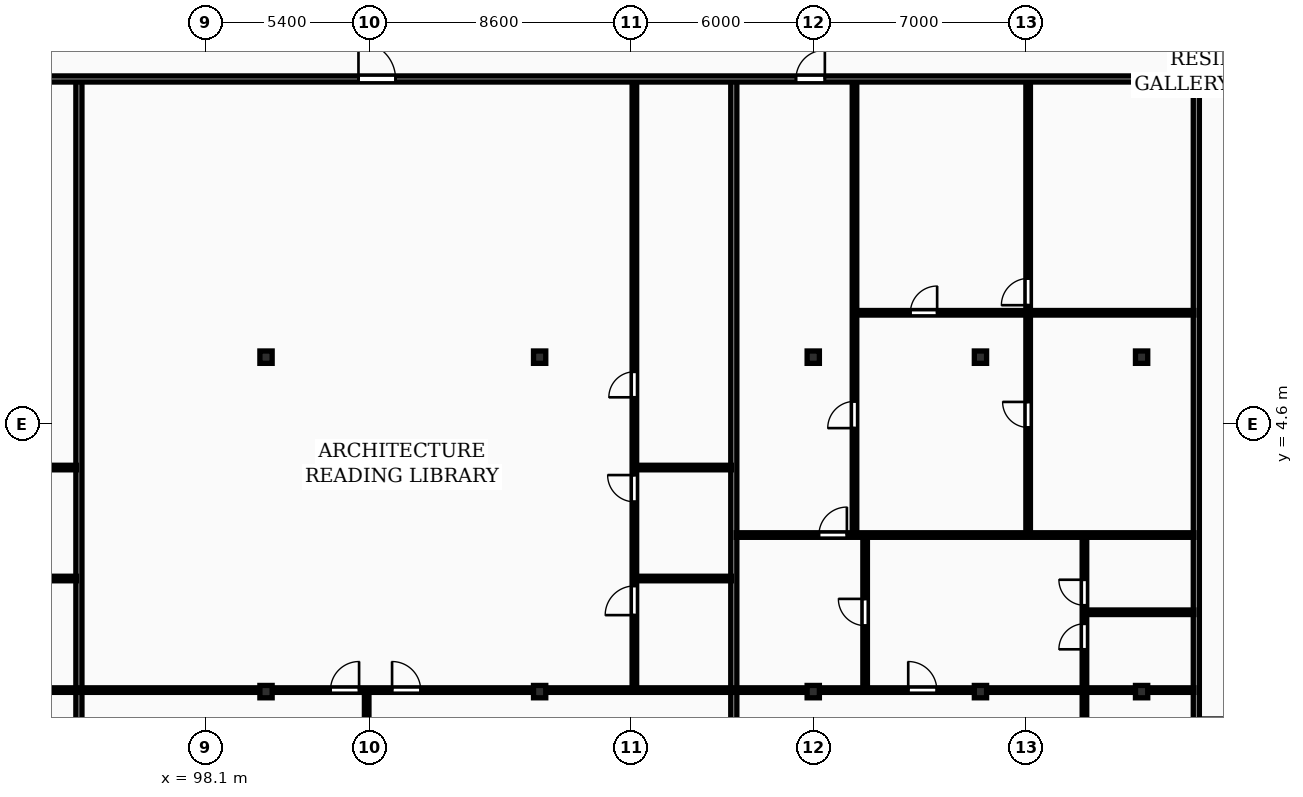
"""IFC4 building model, lengths in metres.
Left out: names, types, materials, properties, quantities, classifications, styles, units other than length and angle.
Written with IfcOpenShell. Run it as: python <this file> out.ifc"""

import sys

from ifc_helpers import new_model, si_unit, direction, frame, frame_2d, origin, origin_2d, place, context, subcontext, project, spatial, rectangle, i_section, extrude, element, fill, save


model = new_model("IFC4")
c1 = context("Model", 3, precision=1e-05, world=origin(), true_north=direction((0.0, 1.0)))
c2 = subcontext(c1, "Body", "Model", "MODEL_VIEW")
j1 = project(units=[si_unit("LENGTHUNIT", "METRE"), si_unit("PLANEANGLEUNIT", "RADIAN")], contexts=[c1])
p1 = place(None, origin())
s1 = spatial("IfcSite", under=j1, at=p1, CompositionType="ELEMENT")
p2 = place(p1, origin())
s2 = spatial("IfcBuilding", under=s1, at=p2, CompositionType="ELEMENT")
p3 = place(p2, frame((0.0, 0.0, 150.1)))
s3 = spatial("IfcBuildingStorey", under=s2, at=p3, CompositionType="ELEMENT", Elevation=150.1)
for number, where, z_axis, x_axis in (
    (1, (100.1, -4.2, 0.0), (0.0, 0.0, 1.0), (1.0, 0.0, 0.0)),
    (2, (100.1, 6.8, 0.0), (0.0, 0.0, 1.0), (1.0, 0.0, 0.0)),
    (3, (109.1, -4.2, 0.0), (0.0, 0.0, 1.0), (1.0, 0.0, 0.0)),
    (4, (109.1, 6.8, 0.0), (0.0, 0.0, 1.0), (1.0, 0.0, 0.0)),
    (5, (118.1, -4.2, 0.0), (0.0, 0.0, 1.0), (1.0, 0.0, 0.0)),
    (6, (118.1, 6.8, 0.0), (0.0, 0.0, 1.0), (1.0, 0.0, 0.0)),
    (7, (123.6, -4.2, 0.0), (0.0, 0.0, 1.0), (1.0, 0.0, 0.0)),
    (8, (123.6, 6.8, 0.0), (0.0, 0.0, 1.0), (1.0, 0.0, 0.0)),
    (9, (128.9, -4.2, 0.0), (0.0, 0.0, 1.0), (1.0, 0.0, 0.0)),
    (10, (128.9, 6.8, 0.0), (0.0, 0.0, 1.0), (1.0, 0.0, 0.0)),
):
    element("IfcColumn", number, at=place(p3, frame(where, z_axis=z_axis, x_axis=x_axis)), inside=s3, PredefinedType="COLUMN", context=c2, shape_type="SweptSolid", body=[
        extrude(i_section(OverallWidth=0.403, OverallDepth=0.406, WebThickness=0.027, FlangeThickness=0.043, FilletRadius=0.015, at=origin_2d()), origin(), (0.0, 0.0, 1.0), 3.6),
    ])
for number, where, z_axis, x_axis in (
    (11, (130.7, -8.7, 0.0), (0.0, 0.0, 1.0), (0.0, 1.0, 0.0)),
    (12, (93.946, -8.7, 0.0), (0.0, 0.0, 1.0), (0.0, 1.0, 0.0)),
):
    element("IfcWall", number, at=place(p3, frame(where, z_axis=z_axis, x_axis=x_axis)), inside=s3, PredefinedType="PARTITIONING", context=c2, shape_type="SweptSolid", body=[
        extrude(rectangle(XDim=24.57, YDim=0.2, at=frame_2d((12.285, 0.0))), origin(), (0.0, 0.0, 1.0), 3.31),
    ])
for number, where, z_axis, x_axis in (
    (13, (90.506, -0.48, 0.0), (0.0, 0.0, 1.0), (1.0, 0.0, 0.0)),
    (14, (90.506, 3.17, 0.0), (0.0, 0.0, 1.0), (1.0, 0.0, 0.0)),
):
    element("IfcWall", number, at=place(p3, frame(where, z_axis=z_axis, x_axis=x_axis)), inside=s3, PredefinedType="PARTITIONING", context=c2, shape_type="SweptSolid", body=[
        extrude(rectangle(XDim=3.36, YDim=0.15, at=frame_2d((1.68, 0.0))), origin(), (0.0, 0.0, 1.0), 3.31),
    ])
p4 = place(p3, frame((72.78, -4.15, 0.0), z_axis=(0.0, 0.0, 1.0), x_axis=(1.0, 0.0, 0.0)))
e15 = element("IfcWall", 15, at=p4, inside=s3, PredefinedType="PARTITIONING", context=c2, shape_type="SweptSolid", body=[
    extrude(rectangle(XDim=21.085, YDim=0.15, at=frame_2d((10.543, 0.0))), origin(), (0.0, 0.0, 1.0), 3.003),
])
p5 = place(p4, frame((6.874, 0.0, 0.0)))
e16 = element("IfcOpeningElement", 16, at=p5, cuts=e15, PredefinedType="OPENING", context=c2, shape_type="SweptSolid", body=[
    extrude(rectangle(XDim=0.92, YDim=2.08, at=frame_2d((0.46, 1.04))), frame((0.0, 0.085, 0.0), z_axis=(0.0, -1.0, 0.0), x_axis=(1.0, 0.0, 0.0)), (0.0, 0.0, 1.0), 0.17),
])
p6 = place(p4, frame((10.797, 0.0, 0.0)))
e17 = element("IfcOpeningElement", 17, at=p6, cuts=e15, PredefinedType="OPENING", context=c2, shape_type="SweptSolid", body=[
    extrude(rectangle(XDim=0.92, YDim=2.08, at=frame_2d((0.46, 1.04))), frame((0.0, 0.085, 0.0), z_axis=(0.0, -1.0, 0.0), x_axis=(1.0, 0.0, 0.0)), (0.0, 0.0, 1.0), 0.17),
])
p7 = place(p3, frame((115.486, -8.7, 0.0), z_axis=(0.0, 0.0, 1.0), x_axis=(0.0, 1.0, 0.0)))
e18 = element("IfcWall", 18, at=p7, inside=s3, PredefinedType="PARTITIONING", context=c2, shape_type="SweptSolid", body=[
    extrude(rectangle(XDim=24.57, YDim=0.2, at=frame_2d((12.285, 0.0))), origin(), (0.0, 0.0, 1.0), 3.31),
])
for number, where, z_axis, x_axis in (
    (19, (112.276, -0.48, 0.0), (0.0, 0.0, 1.0), (1.0, 0.0, 0.0)),
    (20, (112.276, 3.17, 0.0), (0.0, 0.0, 1.0), (1.0, 0.0, 0.0)),
):
    element("IfcWall", number, at=place(p3, frame(where, z_axis=z_axis, x_axis=x_axis)), inside=s3, PredefinedType="PARTITIONING", context=c2, shape_type="SweptSolid", body=[
        extrude(rectangle(XDim=3.13, YDim=0.15, at=frame_2d((1.565, 0.0))), origin(), (0.0, 0.0, 1.0), 3.31),
    ])
p8 = place(p3, frame((112.216, -4.09, 0.0), z_axis=(0.0, 0.0, 1.0), x_axis=(0.0, 1.0, 0.0)))
e21 = element("IfcWall", 21, at=p8, inside=s3, PredefinedType="PARTITIONING", context=c2, shape_type="SweptSolid", body=[
    extrude(rectangle(XDim=19.98, YDim=0.15, at=frame_2d((9.99, 0.0))), origin(), (0.0, 0.0, 1.0), 3.31),
])
p9 = place(p8, frame((2.406, 0.0, 0.0)))
e22 = element("IfcOpeningElement", 22, at=p9, cuts=e21, PredefinedType="OPENING", context=c2, shape_type="SweptSolid", body=[
    extrude(rectangle(XDim=0.96, YDim=2.1, at=frame_2d((0.48, 1.05))), frame((0.0, 0.085, 0.0), z_axis=(0.0, -1.0, 0.0), x_axis=(1.0, 0.0, 0.0)), (0.0, 0.0, 1.0), 0.17),
])
p10 = place(p8, frame((6.133, 0.0, 0.0)))
e23 = element("IfcOpeningElement", 23, at=p10, cuts=e21, PredefinedType="OPENING", context=c2, shape_type="SweptSolid", body=[
    extrude(rectangle(XDim=0.88, YDim=2.06, at=frame_2d((0.44, 1.03))), frame((0.0, 0.085, 0.0), z_axis=(0.0, -1.0, 0.0), x_axis=(1.0, 0.0, 0.0)), (0.0, 0.0, 1.0), 0.17),
])
p11 = place(p8, frame((9.57, 0.0, 0.0)))
e24 = element("IfcOpeningElement", 24, at=p11, cuts=e21, PredefinedType="OPENING", context=c2, shape_type="SweptSolid", body=[
    extrude(rectangle(XDim=0.84, YDim=2.04, at=frame_2d((0.42, 1.02))), frame((0.0, 0.085, 0.0), z_axis=(0.0, -1.0, 0.0), x_axis=(1.0, 0.0, 0.0)), (0.0, 0.0, 1.0), 0.17),
])
p12 = place(p3, frame((103.411, -8.7, 0.0), z_axis=(0.0, 0.0, 1.0), x_axis=(0.0, 1.0, 0.0)))
e25 = element("IfcWall", 25, at=p12, inside=s3, PredefinedType="PARTITIONING", context=c2, shape_type="SweptSolid", body=[
    extrude(rectangle(XDim=4.47, YDim=0.15, at=frame_2d((2.235, 0.0))), origin(), (0.0, 0.0, 1.0), 3.31),
])
p13 = place(p3, frame((94.025, -4.15, 0.0), z_axis=(0.0, 0.0, 1.0), x_axis=(1.0, 0.0, 0.0)))
e26 = element("IfcWall", 26, at=p13, inside=s3, PredefinedType="PARTITIONING", context=c2, shape_type="SweptSolid", body=[
    extrude(rectangle(XDim=21.381, YDim=0.15, at=frame_2d((10.69, 0.0))), origin(), (0.0, 0.0, 1.0), 3.003),
])
p14 = place(p13, frame((8.195, 0.0, 0.0)))
e27 = element("IfcOpeningElement", 27, at=p14, cuts=e26, PredefinedType="OPENING", context=c2, shape_type="SweptSolid", body=[
    extrude(rectangle(XDim=0.94, YDim=2.1, at=frame_2d((0.47, 1.05))), frame((0.0, 0.085, 0.0), z_axis=(0.0, -1.0, 0.0), x_axis=(1.0, 0.0, 0.0)), (0.0, 0.0, 1.0), 0.17),
])
p15 = place(p13, frame((10.22, 0.0, 0.0)))
e28 = element("IfcOpeningElement", 28, at=p15, cuts=e26, PredefinedType="OPENING", context=c2, shape_type="SweptSolid", body=[
    extrude(rectangle(XDim=0.94, YDim=2.1, at=frame_2d((0.47, 1.05))), frame((0.0, 0.085, 0.0), z_axis=(0.0, -1.0, 0.0), x_axis=(1.0, 0.0, 0.0)), (0.0, 0.0, 1.0), 0.17),
])
p16 = place(p3, frame((125.168, 0.99, 0.0), z_axis=(0.0, 0.0, 1.0), x_axis=(0.0, 1.0, 0.0)))
e29 = element("IfcWall", 29, at=p16, inside=s3, PredefinedType="PARTITIONING", context=c2, shape_type="SweptSolid", body=[
    extrude(rectangle(XDim=14.9, YDim=0.15, at=frame_2d((7.45, 0.0))), origin(), (0.0, 0.0, 1.0), 3.31),
])
p17 = place(p16, frame((3.498, 0.0, 0.0)))
e30 = element("IfcOpeningElement", 30, at=p17, cuts=e29, PredefinedType="OPENING", context=c2, shape_type="SweptSolid", body=[
    extrude(rectangle(XDim=0.84, YDim=2.04, at=frame_2d((0.42, 1.02))), frame((0.0, 0.085, 0.0), z_axis=(0.0, -1.0, 0.0), x_axis=(1.0, 0.0, 0.0)), (0.0, 0.0, 1.0), 0.17),
])
p18 = place(p16, frame((7.52, 0.0, 0.0)))
e31 = element("IfcOpeningElement", 31, at=p18, cuts=e29, PredefinedType="OPENING", context=c2, shape_type="SweptSolid", body=[
    extrude(rectangle(XDim=0.88, YDim=2.06, at=frame_2d((0.44, 1.03))), frame((0.0, 0.085, 0.0), z_axis=(0.0, -1.0, 0.0), x_axis=(1.0, 0.0, 0.0)), (0.0, 0.0, 1.0), 0.17),
])
p19 = place(p3, frame((119.516, 8.26, 0.0), z_axis=(0.0, 0.0, 1.0), x_axis=(1.0, 0.0, 0.0)))
e32 = element("IfcWall", 32, at=p19, inside=s3, PredefinedType="PARTITIONING", context=c2, shape_type="SweptSolid", body=[
    extrude(rectangle(XDim=11.104, YDim=0.15, at=frame_2d((5.552, 0.0))), origin(), (0.0, 0.0, 1.0), 3.31),
])
p20 = place(p19, frame((1.779, 0.0, 0.0)))
e33 = element("IfcOpeningElement", 33, at=p20, cuts=e32, PredefinedType="OPENING", context=c2, shape_type="SweptSolid", body=[
    extrude(rectangle(XDim=0.88, YDim=2.06, at=frame_2d((0.44, 1.03))), frame((0.0, 0.085, 0.0), z_axis=(0.0, -1.0, 0.0), x_axis=(1.0, 0.0, 0.0)), (0.0, 0.0, 1.0), 0.17),
])
p21 = place(p3, frame((119.456, 0.99, 0.0), z_axis=(0.0, 0.0, 1.0), x_axis=(0.0, 1.0, 0.0)))
e34 = element("IfcWall", 34, at=p21, inside=s3, PredefinedType="PARTITIONING", context=c2, shape_type="SweptSolid", body=[
    extrude(rectangle(XDim=14.9, YDim=0.15, at=frame_2d((7.45, 0.0))), origin(), (0.0, 0.0, 1.0), 3.31),
])
p22 = place(p21, frame((3.477, 0.0, 0.0)))
e35 = element("IfcOpeningElement", 35, at=p22, cuts=e34, PredefinedType="OPENING", context=c2, shape_type="SweptSolid", body=[
    extrude(rectangle(XDim=0.88, YDim=2.06, at=frame_2d((0.44, 1.03))), frame((0.0, 0.085, 0.0), z_axis=(0.0, -1.0, 0.0), x_axis=(1.0, 0.0, 0.0)), (0.0, 0.0, 1.0), 0.17),
])
p23 = place(p3, frame((119.806, -4.09, 0.0), z_axis=(0.0, 0.0, 1.0), x_axis=(0.0, 1.0, 0.0)))
e36 = element("IfcWall", 36, at=p23, inside=s3, PredefinedType="PARTITIONING", context=c2, shape_type="SweptSolid", body=[
    extrude(rectangle(XDim=5.0, YDim=0.15, at=frame_2d((2.5, 0.0))), origin(), (0.0, 0.0, 1.0), 3.31),
])
p24 = place(p23, frame((2.06, 0.0, 0.0)))
e37 = element("IfcOpeningElement", 37, at=p24, cuts=e36, PredefinedType="OPENING", context=c2, shape_type="SweptSolid", body=[
    extrude(rectangle(XDim=0.88, YDim=2.06, at=frame_2d((0.44, 1.03))), frame((0.0, 0.085, 0.0), z_axis=(0.0, -1.0, 0.0), x_axis=(1.0, 0.0, 0.0)), (0.0, 0.0, 1.0), 0.17),
])
p25 = place(p3, frame((127.08, -1.59, 0.0), z_axis=(0.0, 0.0, 1.0), x_axis=(1.0, 0.0, 0.0)))
e38 = element("IfcWall", 38, at=p25, inside=s3, PredefinedType="PARTITIONING", context=c2, shape_type="SweptSolid", body=[
    extrude(rectangle(XDim=3.54, YDim=0.15, at=frame_2d((1.77, 0.0))), origin(), (0.0, 0.0, 1.0), 3.31),
])
p26 = place(p3, frame((127.02, -8.7, 0.0), z_axis=(0.0, 0.0, 1.0), x_axis=(0.0, 1.0, 0.0)))
e39 = element("IfcWall", 39, at=p26, inside=s3, PredefinedType="PARTITIONING", context=c2, shape_type="SweptSolid", body=[
    extrude(rectangle(XDim=9.61, YDim=0.15, at=frame_2d((4.805, 0.0))), origin(), (0.0, 0.0, 1.0), 3.31),
])
p27 = place(p26, frame((5.892, 0.0, 0.0)))
e40 = element("IfcOpeningElement", 40, at=p27, cuts=e39, PredefinedType="OPENING", context=c2, shape_type="SweptSolid", body=[
    extrude(rectangle(XDim=0.84, YDim=2.04, at=frame_2d((0.42, 1.02))), frame((0.0, 0.085, 0.0), z_axis=(0.0, -1.0, 0.0), x_axis=(1.0, 0.0, 0.0)), (0.0, 0.0, 1.0), 0.17),
])
p28 = place(p26, frame((7.34, 0.0, 0.0)))
e41 = element("IfcOpeningElement", 41, at=p28, cuts=e39, PredefinedType="OPENING", context=c2, shape_type="SweptSolid", body=[
    extrude(rectangle(XDim=0.84, YDim=2.04, at=frame_2d((0.42, 1.02))), frame((0.0, 0.085, 0.0), z_axis=(0.0, -1.0, 0.0), x_axis=(1.0, 0.0, 0.0)), (0.0, 0.0, 1.0), 0.17),
])
p29 = place(p26, frame((2.194, 0.0, 0.0)))
e42 = element("IfcOpeningElement", 42, at=p29, cuts=e39, PredefinedType="OPENING", context=c2, shape_type="SweptSolid", body=[
    extrude(rectangle(XDim=0.88, YDim=2.06, at=frame_2d((0.44, 1.03))), frame((0.0, 0.085, 0.0), z_axis=(0.0, -1.0, 0.0), x_axis=(1.0, 0.0, 0.0)), (0.0, 0.0, 1.0), 0.17),
])
p30 = place(p3, frame((115.566, 0.95, 0.0), z_axis=(0.0, 0.0, 1.0), x_axis=(1.0, 0.0, 0.0)))
e43 = element("IfcWall", 43, at=p30, inside=s3, PredefinedType="PARTITIONING", context=c2, shape_type="SweptSolid", body=[
    extrude(rectangle(XDim=15.054, YDim=0.15, at=frame_2d((7.527, 0.0))), origin(), (0.0, 0.0, 1.0), 3.31),
])
p31 = place(p30, frame((2.72, 0.0, 0.0)))
e44 = element("IfcOpeningElement", 44, at=p31, cuts=e43, PredefinedType="OPENING", context=c2, shape_type="SweptSolid", body=[
    extrude(rectangle(XDim=0.92, YDim=2.08, at=frame_2d((0.46, 1.04))), frame((0.0, 0.085, 0.0), z_axis=(0.0, -1.0, 0.0), x_axis=(1.0, 0.0, 0.0)), (0.0, 0.0, 1.0), 0.17),
])
p32 = place(p3, frame((115.566, -4.15, 0.0), z_axis=(0.0, 0.0, 1.0), x_axis=(1.0, 0.0, 0.0)))
e45 = element("IfcWall", 45, at=p32, inside=s3, PredefinedType="PARTITIONING", context=c2, shape_type="SweptSolid", body=[
    extrude(rectangle(XDim=15.054, YDim=0.15, at=frame_2d((7.527, 0.0))), origin(), (0.0, 0.0, 1.0), 3.003),
])
p33 = place(p32, frame((5.657, 0.0, 0.0)))
e46 = element("IfcOpeningElement", 46, at=p33, cuts=e45, PredefinedType="OPENING", context=c2, shape_type="SweptSolid", body=[
    extrude(rectangle(XDim=0.94, YDim=2.1, at=frame_2d((0.47, 1.05))), frame((0.0, 0.085, 0.0), z_axis=(0.0, -1.0, 0.0), x_axis=(1.0, 0.0, 0.0)), (0.0, 0.0, 1.0), 0.17),
])
p34 = place(p3, frame((72.7, 15.95, 0.0), z_axis=(0.0, 0.0, 1.0), x_axis=(1.0, 0.0, 0.0)))
e47 = element("IfcWall", 47, at=p34, inside=s3, PredefinedType="PARTITIONING", context=c2, shape_type="SweptSolid", body=[
    extrude(rectangle(XDim=58.0, YDim=0.2, at=frame_2d((29.0, 0.0))), origin(), (0.0, 0.0, 1.0), 3.31),
])
p35 = place(p34, frame((10.868, 0.0, 0.0)))
e48 = element("IfcOpeningElement", 48, at=p35, cuts=e47, PredefinedType="OPENING", context=c2, shape_type="SweptSolid", body=[
    extrude(rectangle(XDim=1.22, YDim=2.18, at=frame_2d((0.61, 1.09))), frame((0.0, 0.11, 0.0), z_axis=(0.0, -1.0, 0.0), x_axis=(1.0, 0.0, 0.0)), (0.0, 0.0, 1.0), 0.22),
])
p36 = place(p34, frame((30.441, 0.0, 0.0)))
e49 = element("IfcOpeningElement", 49, at=p36, cuts=e47, PredefinedType="OPENING", context=c2, shape_type="SweptSolid", body=[
    extrude(rectangle(XDim=1.22, YDim=2.18, at=frame_2d((0.61, 1.09))), frame((0.0, 0.11, 0.0), z_axis=(0.0, -1.0, 0.0), x_axis=(1.0, 0.0, 0.0)), (0.0, 0.0, 1.0), 0.22),
])
p37 = place(p34, frame((44.831, 0.0, 0.0)))
e50 = element("IfcOpeningElement", 50, at=p37, cuts=e47, PredefinedType="OPENING", context=c2, shape_type="SweptSolid", body=[
    extrude(rectangle(XDim=0.95, YDim=2.15, at=frame_2d((0.475, 1.075))), frame((0.0, 0.11, 0.0), z_axis=(0.0, -1.0, 0.0), x_axis=(1.0, 0.0, 0.0)), (0.0, 0.0, 1.0), 0.22),
])
p38 = place(p9, origin())
e51 = element("IfcDoor", 51, at=p38, inside=s3, OperationType="SINGLE_SWING_LEFT", PredefinedType="DOOR", context=c2, shape_type="SweptSolid", body=[
    extrude(rectangle(XDim=0.96, YDim=2.1, at=frame_2d((0.48, 1.05))), frame((0.0, 0.025, 0.0), z_axis=(0.0, -1.0, 0.0), x_axis=(1.0, 0.0, 0.0)), (0.0, 0.0, 1.0), 0.05),
])
fill(e22, e51)
p39 = place(p10, origin())
e52 = element("IfcDoor", 52, at=p39, inside=s3, OperationType="SINGLE_SWING_RIGHT", PredefinedType="DOOR", context=c2, shape_type="SweptSolid", body=[
    extrude(rectangle(XDim=0.88, YDim=2.06, at=frame_2d((0.44, 1.03))), frame((0.0, 0.025, 0.0), z_axis=(0.0, -1.0, 0.0), x_axis=(1.0, 0.0, 0.0)), (0.0, 0.0, 1.0), 0.05),
])
fill(e23, e52)
p40 = place(p11, origin())
e53 = element("IfcDoor", 53, at=p40, inside=s3, OperationType="SINGLE_SWING_LEFT", PredefinedType="DOOR", context=c2, shape_type="SweptSolid", body=[
    extrude(rectangle(XDim=0.84, YDim=2.04, at=frame_2d((0.42, 1.02))), frame((0.0, 0.025, 0.0), z_axis=(0.0, -1.0, 0.0), x_axis=(1.0, 0.0, 0.0)), (0.0, 0.0, 1.0), 0.05),
])
fill(e24, e53)
p41 = place(p14, origin())
e54 = element("IfcDoor", 54, at=p41, inside=s3, OperationType="SINGLE_SWING_RIGHT", PredefinedType="DOOR", context=c2, shape_type="SweptSolid", body=[
    extrude(rectangle(XDim=0.94, YDim=2.1, at=frame_2d((0.47, 1.05))), frame((0.0, 0.025, 0.0), z_axis=(0.0, -1.0, 0.0), x_axis=(1.0, 0.0, 0.0)), (0.0, 0.0, 1.0), 0.05),
])
fill(e27, e54)
p42 = place(p15, origin())
e55 = element("IfcDoor", 55, at=p42, inside=s3, OperationType="SINGLE_SWING_LEFT", PredefinedType="DOOR", context=c2, shape_type="SweptSolid", body=[
    extrude(rectangle(XDim=0.94, YDim=2.1, at=frame_2d((0.47, 1.05))), frame((0.0, 0.025, 0.0), z_axis=(0.0, -1.0, 0.0), x_axis=(1.0, 0.0, 0.0)), (0.0, 0.0, 1.0), 0.05),
])
fill(e28, e55)
p43 = place(p17, origin())
e56 = element("IfcDoor", 56, at=p43, inside=s3, OperationType="SINGLE_SWING_RIGHT", PredefinedType="DOOR", context=c2, shape_type="SweptSolid", body=[
    extrude(rectangle(XDim=0.84, YDim=2.04, at=frame_2d((0.42, 1.02))), frame((0.0, 0.025, 0.0), z_axis=(0.0, -1.0, 0.0), x_axis=(1.0, 0.0, 0.0)), (0.0, 0.0, 1.0), 0.05),
])
fill(e30, e56)
p44 = place(p18, origin())
e57 = element("IfcDoor", 57, at=p44, inside=s3, OperationType="SINGLE_SWING_LEFT", PredefinedType="DOOR", context=c2, shape_type="SweptSolid", body=[
    extrude(rectangle(XDim=0.88, YDim=2.06, at=frame_2d((0.44, 1.03))), frame((0.0, 0.025, 0.0), z_axis=(0.0, -1.0, 0.0), x_axis=(1.0, 0.0, 0.0)), (0.0, 0.0, 1.0), 0.05),
])
fill(e31, e57)
p45 = place(p20, origin())
e58 = element("IfcDoor", 58, at=p45, inside=s3, OperationType="SINGLE_SWING_RIGHT", PredefinedType="DOOR", context=c2, shape_type="SweptSolid", body=[
    extrude(rectangle(XDim=0.88, YDim=2.06, at=frame_2d((0.44, 1.03))), frame((0.0, 0.025, 0.0), z_axis=(0.0, -1.0, 0.0), x_axis=(1.0, 0.0, 0.0)), (0.0, 0.0, 1.0), 0.05),
])
fill(e33, e58)
p46 = place(p22, origin())
e59 = element("IfcDoor", 59, at=p46, inside=s3, OperationType="SINGLE_SWING_LEFT", PredefinedType="DOOR", context=c2, shape_type="SweptSolid", body=[
    extrude(rectangle(XDim=0.88, YDim=2.06, at=frame_2d((0.44, 1.03))), frame((0.0, 0.025, 0.0), z_axis=(0.0, -1.0, 0.0), x_axis=(1.0, 0.0, 0.0)), (0.0, 0.0, 1.0), 0.05),
])
fill(e35, e59)
p47 = place(p24, origin())
e60 = element("IfcDoor", 60, at=p47, inside=s3, OperationType="SINGLE_SWING_RIGHT", PredefinedType="DOOR", context=c2, shape_type="SweptSolid", body=[
    extrude(rectangle(XDim=0.88, YDim=2.06, at=frame_2d((0.44, 1.03))), frame((0.0, 0.025, 0.0), z_axis=(0.0, -1.0, 0.0), x_axis=(1.0, 0.0, 0.0)), (0.0, 0.0, 1.0), 0.05),
])
fill(e37, e60)
p48 = place(p27, origin())
e61 = element("IfcDoor", 61, at=p48, inside=s3, OperationType="SINGLE_SWING_LEFT", PredefinedType="DOOR", context=c2, shape_type="SweptSolid", body=[
    extrude(rectangle(XDim=0.84, YDim=2.04, at=frame_2d((0.42, 1.02))), frame((0.0, 0.025, 0.0), z_axis=(0.0, -1.0, 0.0), x_axis=(1.0, 0.0, 0.0)), (0.0, 0.0, 1.0), 0.05),
])
fill(e40, e61)
p49 = place(p28, origin())
e62 = element("IfcDoor", 62, at=p49, inside=s3, OperationType="SINGLE_SWING_RIGHT", PredefinedType="DOOR", context=c2, shape_type="SweptSolid", body=[
    extrude(rectangle(XDim=0.84, YDim=2.04, at=frame_2d((0.42, 1.02))), frame((0.0, 0.025, 0.0), z_axis=(0.0, -1.0, 0.0), x_axis=(1.0, 0.0, 0.0)), (0.0, 0.0, 1.0), 0.05),
])
fill(e41, e62)
p50 = place(p31, origin())
e63 = element("IfcDoor", 63, at=p50, inside=s3, OperationType="SINGLE_SWING_RIGHT", PredefinedType="DOOR", context=c2, shape_type="SweptSolid", body=[
    extrude(rectangle(XDim=0.92, YDim=2.08, at=frame_2d((0.46, 1.04))), frame((0.0, 0.025, 0.0), z_axis=(0.0, -1.0, 0.0), x_axis=(1.0, 0.0, 0.0)), (0.0, 0.0, 1.0), 0.05),
])
fill(e44, e63)
p51 = place(p33, origin())
e64 = element("IfcDoor", 64, at=p51, inside=s3, OperationType="SINGLE_SWING_LEFT", PredefinedType="DOOR", context=c2, shape_type="SweptSolid", body=[
    extrude(rectangle(XDim=0.94, YDim=2.1, at=frame_2d((0.47, 1.05))), frame((0.0, 0.025, 0.0), z_axis=(0.0, -1.0, 0.0), x_axis=(1.0, 0.0, 0.0)), (0.0, 0.0, 1.0), 0.05),
])
fill(e46, e64)
p52 = place(p36, origin())
e65 = element("IfcDoor", 65, at=p52, inside=s3, OperationType="SINGLE_SWING_LEFT", PredefinedType="DOOR", context=c2, shape_type="SweptSolid", body=[
    extrude(rectangle(XDim=1.22, YDim=2.18, at=frame_2d((0.61, 1.09))), frame((0.0, 0.025, 0.0), z_axis=(0.0, -1.0, 0.0), x_axis=(1.0, 0.0, 0.0)), (0.0, 0.0, 1.0), 0.05),
])
fill(e49, e65)
p53 = place(p37, origin())
e66 = element("IfcDoor", 66, at=p53, inside=s3, OperationType="SINGLE_SWING_RIGHT", PredefinedType="DOOR", context=c2, shape_type="SweptSolid", body=[
    extrude(rectangle(XDim=0.95, YDim=2.15, at=frame_2d((0.475, 1.075))), frame((0.0, 0.025, 0.0), z_axis=(0.0, -1.0, 0.0), x_axis=(1.0, 0.0, 0.0)), (0.0, 0.0, 1.0), 0.05),
])
fill(e50, e66)
save(model, sys.argv[1])
